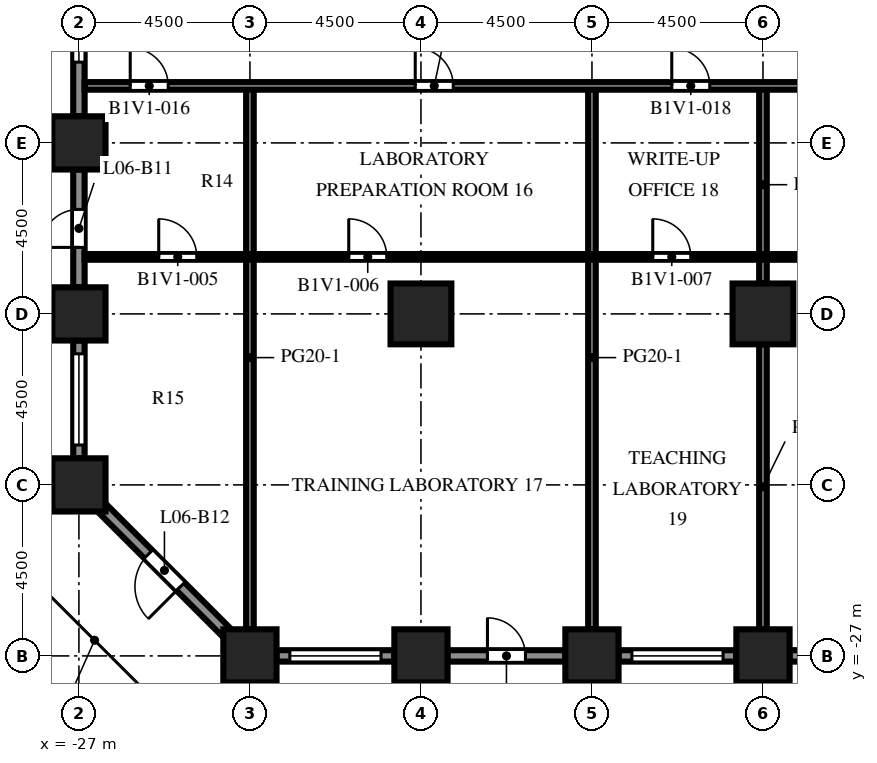
"""IFC4 building model, lengths in metres.
Left out: names, types, materials, properties, quantities, classifications, styles, units other than length and angle.
Written with IfcOpenShell. Run it as: python <this file> out.ifc"""

import sys

from ifc_helpers import new_model, si_unit, direction, frame, frame_2d, origin, origin_2d, place, context, subcontext, project, spatial, rectangle, extrude, element, fill, save


model = new_model("IFC4")
c1 = context("Model", 3, precision=1e-05, world=origin(), true_north=direction((0.0, 1.0)))
c2 = subcontext(c1, "Body", "Model", "MODEL_VIEW")
j1 = project(units=[si_unit("LENGTHUNIT", "METRE"), si_unit("PLANEANGLEUNIT", "RADIAN")], contexts=[c1])
p1 = place(None, origin())
s1 = spatial("IfcSite", under=j1, at=p1, CompositionType="ELEMENT")
p2 = place(p1, origin())
s2 = spatial("IfcBuilding", under=s1, at=p2, CompositionType="ELEMENT")
p3 = place(p2, frame((0.0, 0.0, 27.7)))
s3 = spatial("IfcBuildingStorey", under=s2, at=p3, CompositionType="ELEMENT", Elevation=27.7)
for number, where, z_axis, x_axis in (
    (1, (-27.0, -22.5, 0.0), (0.0, 0.0, 1.0), (1.0, 0.0, 0.0)),
    (2, (-27.0, -18.0, 0.0), (0.0, 0.0, 1.0), (1.0, 0.0, 0.0)),
    (3, (-27.0, -13.5, 0.0), (0.0, 0.0, 1.0), (1.0, 0.0, 0.0)),
    (4, (-22.5, -27.0, 0.0), (0.0, 0.0, 1.0), (1.0, 0.0, 0.0)),
    (5, (-18.0, -27.0, 0.0), (0.0, 0.0, 1.0), (1.0, 0.0, 0.0)),
    (6, (-13.5, -27.0, 0.0), (0.0, 0.0, 1.0), (1.0, 0.0, 0.0)),
    (7, (-9.0, -27.0, 0.0), (0.0, 0.0, 1.0), (1.0, 0.0, 0.0)),
):
    element("IfcColumn", number, at=place(p3, frame(where, z_axis=z_axis, x_axis=x_axis)), inside=s3, PredefinedType="COLUMN", context=c2, shape_type="SweptSolid", body=[
        extrude(rectangle(XDim=1.4, YDim=1.4, at=origin_2d()), origin(), (0.0, 0.0, 1.0), 4.1),
    ])
for number, where, z_axis, x_axis in (
    (8, (-18.0, -18.0, 0.0), (0.0, 0.0, 1.0), (1.0, 0.0, 0.0)),
    (9, (-9.0, -18.0, 0.0), (0.0, 0.0, 1.0), (1.0, 0.0, 0.0)),
):
    element("IfcColumn", number, at=place(p3, frame(where, z_axis=z_axis, x_axis=x_axis)), inside=s3, PredefinedType="COLUMN", context=c2, shape_type="SweptSolid", body=[
        extrude(rectangle(XDim=1.6, YDim=1.6, at=origin_2d()), origin(), (0.0, 0.0, 1.0), 4.1),
    ])
p4 = place(p3, frame((-18.7, -27.0, 0.0), z_axis=(0.0, 0.0, 1.0), x_axis=(-1.0, 0.0, 0.0)))
e10 = element("IfcWall", 10, at=p4, inside=s3, PredefinedType="SOLIDWALL", context=c2, shape_type="SweptSolid", body=[
    extrude(rectangle(XDim=3.1, YDim=0.3, at=frame_2d((1.55, 0.0))), origin(), (0.0, 0.0, 1.0), 2.75),
])
p5 = place(p4, frame((0.35, 0.0, 0.8)))
e11 = element("IfcOpeningElement", 11, at=p5, cuts=e10, PredefinedType="OPENING", context=c2, shape_type="SweptSolid", body=[
    extrude(rectangle(XDim=2.4, YDim=1.7, at=frame_2d((1.2, 0.85))), frame((0.0, 0.16, 0.0), z_axis=(0.0, -1.0, 0.0), x_axis=(1.0, 0.0, 0.0)), (0.0, 0.0, 1.0), 0.32),
])
p6 = place(p3, frame((-14.2, -27.0, 0.0), z_axis=(0.0, 0.0, 1.0), x_axis=(-1.0, 0.0, 0.0)))
e12 = element("IfcWall", 12, at=p6, inside=s3, PredefinedType="SOLIDWALL", context=c2, shape_type="SweptSolid", body=[
    extrude(rectangle(XDim=3.1, YDim=0.3, at=frame_2d((1.55, 0.0))), origin(), (0.0, 0.0, 1.0), 2.75),
])
p7 = place(p6, frame((1.05, 0.0, 0.0)))
e13 = element("IfcOpeningElement", 13, at=p7, cuts=e12, PredefinedType="OPENING", context=c2, shape_type="SweptSolid", body=[
    extrude(rectangle(XDim=1.0, YDim=2.2, at=frame_2d((0.5, 1.1))), frame((0.0, 0.16, 0.0), z_axis=(0.0, -1.0, 0.0), x_axis=(1.0, 0.0, 0.0)), (0.0, 0.0, 1.0), 0.32),
])
p8 = place(p3, frame((-9.7, -27.0, 0.0), z_axis=(0.0, 0.0, 1.0), x_axis=(-1.0, 0.0, 0.0)))
e14 = element("IfcWall", 14, at=p8, inside=s3, PredefinedType="SOLIDWALL", context=c2, shape_type="SweptSolid", body=[
    extrude(rectangle(XDim=3.1, YDim=0.3, at=frame_2d((1.55, 0.0))), origin(), (0.0, 0.0, 1.0), 2.75),
])
p9 = place(p8, frame((0.35, 0.0, 0.8)))
e15 = element("IfcOpeningElement", 15, at=p9, cuts=e14, PredefinedType="OPENING", context=c2, shape_type="SweptSolid", body=[
    extrude(rectangle(XDim=2.4, YDim=1.7, at=frame_2d((1.2, 0.85))), frame((0.0, 0.16, 0.0), z_axis=(0.0, -1.0, 0.0), x_axis=(1.0, 0.0, 0.0)), (0.0, 0.0, 1.0), 0.32),
])
p10 = place(p3, frame((-5.2, -27.0, 0.0), z_axis=(0.0, 0.0, 1.0), x_axis=(-1.0, 0.0, 0.0)))
e16 = element("IfcWall", 16, at=p10, inside=s3, PredefinedType="SOLIDWALL", context=c2, shape_type="SweptSolid", body=[
    extrude(rectangle(XDim=3.1, YDim=0.3, at=frame_2d((1.55, 0.0))), origin(), (0.0, 0.0, 1.0), 2.75),
])
p11 = place(p10, frame((0.35, 0.0, 0.8)))
e17 = element("IfcOpeningElement", 17, at=p11, cuts=e16, PredefinedType="OPENING", context=c2, shape_type="SweptSolid", body=[
    extrude(rectangle(XDim=2.4, YDim=1.7, at=frame_2d((1.2, 0.85))), frame((0.0, 0.16, 0.0), z_axis=(0.0, -1.0, 0.0), x_axis=(1.0, 0.0, 0.0)), (0.0, 0.0, 1.0), 0.32),
])
p12 = place(p3, frame((-27.0, -12.8, 0.0), z_axis=(0.0, 0.0, 1.0), x_axis=(0.0, 1.0, 0.0)))
e18 = element("IfcWall", 18, at=p12, inside=s3, PredefinedType="SOLIDWALL", context=c2, shape_type="SweptSolid", body=[
    extrude(rectangle(XDim=3.1, YDim=0.3, at=frame_2d((1.55, 0.0))), origin(), (0.0, 0.0, 1.0), 2.75),
])
p13 = place(p12, frame((1.425, 0.0, 0.8)))
e19 = element("IfcOpeningElement", 19, at=p13, cuts=e18, PredefinedType="OPENING", context=c2, shape_type="SweptSolid", body=[
    extrude(rectangle(XDim=1.2, YDim=1.7, at=frame_2d((0.6, 0.85))), frame((0.0, 0.16, 0.0), z_axis=(0.0, -1.0, 0.0), x_axis=(1.0, 0.0, 0.0)), (0.0, 0.0, 1.0), 0.32),
])
p14 = place(p3, frame((-27.0, -17.3, 0.0), z_axis=(0.0, 0.0, 1.0), x_axis=(0.0, 1.0, 0.0)))
e20 = element("IfcWall", 20, at=p14, inside=s3, PredefinedType="SOLIDWALL", context=c2, shape_type="SweptSolid", body=[
    extrude(rectangle(XDim=3.1, YDim=0.3, at=frame_2d((1.55, 0.0))), origin(), (0.0, 0.0, 1.0), 2.75),
])
p15 = place(p14, frame((1.05, 0.0, 0.0)))
e21 = element("IfcOpeningElement", 21, at=p15, cuts=e20, PredefinedType="OPENING", context=c2, shape_type="SweptSolid", body=[
    extrude(rectangle(XDim=1.0, YDim=2.2, at=frame_2d((0.5, 1.1))), frame((0.0, 0.16, 0.0), z_axis=(0.0, -1.0, 0.0), x_axis=(1.0, 0.0, 0.0)), (0.0, 0.0, 1.0), 0.32),
])
p16 = place(p3, frame((-27.0, -21.8, 0.0), z_axis=(0.0, 0.0, 1.0), x_axis=(0.0, 1.0, 0.0)))
e22 = element("IfcWall", 22, at=p16, inside=s3, PredefinedType="SOLIDWALL", context=c2, shape_type="SweptSolid", body=[
    extrude(rectangle(XDim=3.1, YDim=0.3, at=frame_2d((1.55, 0.0))), origin(), (0.0, 0.0, 1.0), 2.75),
])
p17 = place(p16, frame((0.35, 0.0, 0.8)))
e23 = element("IfcOpeningElement", 23, at=p17, cuts=e22, PredefinedType="OPENING", context=c2, shape_type="SweptSolid", body=[
    extrude(rectangle(XDim=2.4, YDim=1.7, at=frame_2d((1.2, 0.85))), frame((0.0, 0.16, 0.0), z_axis=(0.0, -1.0, 0.0), x_axis=(1.0, 0.0, 0.0)), (0.0, 0.0, 1.0), 0.32),
])
p18 = place(p3, frame((-23.094, -26.406, 0.0), z_axis=(0.0, 0.0, 1.0), x_axis=(-0.707106781187, 0.707106781187, 0.0)))
e24 = element("IfcWall", 24, at=p18, inside=s3, PredefinedType="SOLIDWALL", context=c2, shape_type="SweptSolid", body=[
    extrude(rectangle(XDim=4.684, YDim=0.3, at=frame_2d((2.342, 0.0))), origin(), (0.0, 0.0, 1.0), 2.75),
])
p19 = place(p18, frame((1.742, 0.0, 0.0)))
e25 = element("IfcOpeningElement", 25, at=p19, cuts=e24, PredefinedType="OPENING", context=c2, shape_type="SweptSolid", body=[
    extrude(rectangle(XDim=1.2, YDim=2.2, at=frame_2d((0.6, 1.1))), frame((0.0, 0.16, 0.0), z_axis=(0.0, -1.0, 0.0), x_axis=(1.0, 0.0, 0.0)), (0.0, 0.0, 1.0), 0.32),
])
for number, where, z_axis, x_axis in (
    (26, (-22.5, -26.3, 0.0), (0.0, 0.0, 1.0), (0.0, 1.0, 0.0)),
    (27, (-13.5, -26.3, 0.0), (0.0, 0.0, 1.0), (0.0, 1.0, 0.0)),
):
    element("IfcWall", number, at=place(p3, frame(where, z_axis=z_axis, x_axis=x_axis)), inside=s3, PredefinedType="PARTITIONING", context=c2, shape_type="SweptSolid", body=[
        extrude(rectangle(XDim=14.3, YDim=0.2, at=frame_2d((7.15, 0.0))), origin(), (0.0, 0.0, 1.0), 3.65),
    ])
p20 = place(p3, frame((-9.0, -26.3, 0.0), z_axis=(0.0, 0.0, 1.0), x_axis=(0.0, 1.0, 0.0)))
e28 = element("IfcWall", 28, at=p20, inside=s3, PredefinedType="PARTITIONING", context=c2, shape_type="SweptSolid", body=[
    extrude(rectangle(XDim=7.5, YDim=0.2, at=frame_2d((3.75, 0.0))), origin(), (0.0, 0.0, 1.0), 3.65),
])
p21 = place(p3, frame((-9.0, -17.2, 0.0), z_axis=(0.0, 0.0, 1.0), x_axis=(0.0, 1.0, 0.0)))
e29 = element("IfcWall", 29, at=p21, inside=s3, PredefinedType="PARTITIONING", context=c2, shape_type="SweptSolid", body=[
    extrude(rectangle(XDim=5.2, YDim=0.2, at=frame_2d((2.6, 0.0))), origin(), (0.0, 0.0, 1.0), 3.65),
])
p22 = place(p3, frame((26.85, -16.5, 0.0), z_axis=(0.0, 0.0, 1.0), x_axis=(-1.0, 0.0, 0.0)))
e30 = element("IfcWall", 30, at=p22, inside=s3, PredefinedType="PARTITIONING", context=c2, shape_type="SweptSolid", body=[
    extrude(rectangle(XDim=53.7, YDim=0.15, at=frame_2d((26.85, 0.0))), origin(), (0.0, 0.0, 1.0), 3.65),
])
p23 = place(p22, frame((50.75, 0.0, 0.0)))
e31 = element("IfcOpeningElement", 31, at=p23, cuts=e30, PredefinedType="OPENING", context=c2, shape_type="SweptSolid", body=[
    extrude(rectangle(XDim=1.0, YDim=2.1, at=frame_2d((0.5, 1.05))), frame((0.0, 0.085, 0.0), z_axis=(0.0, -1.0, 0.0), x_axis=(1.0, 0.0, 0.0)), (0.0, 0.0, 1.0), 0.17),
])
p24 = place(p22, frame((45.75, 0.0, 0.0)))
e32 = element("IfcOpeningElement", 32, at=p24, cuts=e30, PredefinedType="OPENING", context=c2, shape_type="SweptSolid", body=[
    extrude(rectangle(XDim=1.0, YDim=2.1, at=frame_2d((0.5, 1.05))), frame((0.0, 0.085, 0.0), z_axis=(0.0, -1.0, 0.0), x_axis=(1.0, 0.0, 0.0)), (0.0, 0.0, 1.0), 0.17),
])
p25 = place(p22, frame((37.75, 0.0, 0.0)))
e33 = element("IfcOpeningElement", 33, at=p25, cuts=e30, PredefinedType="OPENING", context=c2, shape_type="SweptSolid", body=[
    extrude(rectangle(XDim=1.0, YDim=2.1, at=frame_2d((0.5, 1.05))), frame((0.0, 0.085, 0.0), z_axis=(0.0, -1.0, 0.0), x_axis=(1.0, 0.0, 0.0)), (0.0, 0.0, 1.0), 0.17),
])
p26 = place(p22, frame((28.25, 0.0, 0.0)))
e34 = element("IfcOpeningElement", 34, at=p26, cuts=e30, PredefinedType="OPENING", context=c2, shape_type="SweptSolid", body=[
    extrude(rectangle(XDim=1.0, YDim=2.1, at=frame_2d((0.5, 1.05))), frame((0.0, 0.085, 0.0), z_axis=(0.0, -1.0, 0.0), x_axis=(1.0, 0.0, 0.0)), (0.0, 0.0, 1.0), 0.17),
])
p27 = place(p22, frame((19.75, 0.0, 0.0)))
e35 = element("IfcOpeningElement", 35, at=p27, cuts=e30, PredefinedType="OPENING", context=c2, shape_type="SweptSolid", body=[
    extrude(rectangle(XDim=1.0, YDim=2.1, at=frame_2d((0.5, 1.05))), frame((0.0, 0.085, 0.0), z_axis=(0.0, -1.0, 0.0), x_axis=(1.0, 0.0, 0.0)), (0.0, 0.0, 1.0), 0.17),
])
p28 = place(p22, frame((13.5, 0.0, 0.0)))
e36 = element("IfcOpeningElement", 36, at=p28, cuts=e30, PredefinedType="OPENING", context=c2, shape_type="SweptSolid", body=[
    extrude(rectangle(XDim=1.0, YDim=2.1, at=frame_2d((0.5, 1.05))), frame((0.0, 0.085, 0.0), z_axis=(0.0, -1.0, 0.0), x_axis=(1.0, 0.0, 0.0)), (0.0, 0.0, 1.0), 0.17),
])
p29 = place(p22, frame((6.75, 0.0, 0.0)))
e37 = element("IfcOpeningElement", 37, at=p29, cuts=e30, PredefinedType="OPENING", context=c2, shape_type="SweptSolid", body=[
    extrude(rectangle(XDim=1.0, YDim=2.1, at=frame_2d((0.5, 1.05))), frame((0.0, 0.085, 0.0), z_axis=(0.0, -1.0, 0.0), x_axis=(1.0, 0.0, 0.0)), (0.0, 0.0, 1.0), 0.17),
])
p30 = place(p22, frame((1.25, 0.0, 0.0)))
e38 = element("IfcOpeningElement", 38, at=p30, cuts=e30, PredefinedType="OPENING", context=c2, shape_type="SweptSolid", body=[
    extrude(rectangle(XDim=1.0, YDim=2.1, at=frame_2d((0.5, 1.05))), frame((0.0, 0.085, 0.0), z_axis=(0.0, -1.0, 0.0), x_axis=(1.0, 0.0, 0.0)), (0.0, 0.0, 1.0), 0.17),
])
p31 = place(p3, frame((26.85, -12.0, 0.0), z_axis=(0.0, 0.0, 1.0), x_axis=(-1.0, 0.0, 0.0)))
e39 = element("IfcWall", 39, at=p31, inside=s3, PredefinedType="PARTITIONING", context=c2, shape_type="SweptSolid", body=[
    extrude(rectangle(XDim=53.7, YDim=0.2, at=frame_2d((26.85, 0.0))), origin(), (0.0, 0.0, 1.0), 3.65),
])
p32 = place(p31, frame((51.5, 0.0, 0.0)))
e40 = element("IfcOpeningElement", 40, at=p32, cuts=e39, PredefinedType="OPENING", context=c2, shape_type="SweptSolid", body=[
    extrude(rectangle(XDim=1.0, YDim=2.1, at=frame_2d((0.5, 1.05))), frame((0.0, 0.11, 0.0), z_axis=(0.0, -1.0, 0.0), x_axis=(1.0, 0.0, 0.0)), (0.0, 0.0, 1.0), 0.22),
])
p33 = place(p31, frame((44.0, 0.0, 0.0)))
e41 = element("IfcOpeningElement", 41, at=p33, cuts=e39, PredefinedType="OPENING", context=c2, shape_type="SweptSolid", body=[
    extrude(rectangle(XDim=1.0, YDim=2.1, at=frame_2d((0.5, 1.05))), frame((0.0, 0.11, 0.0), z_axis=(0.0, -1.0, 0.0), x_axis=(1.0, 0.0, 0.0)), (0.0, 0.0, 1.0), 0.22),
])
p34 = place(p31, frame((37.25, 0.0, 0.0)))
e42 = element("IfcOpeningElement", 42, at=p34, cuts=e39, PredefinedType="OPENING", context=c2, shape_type="SweptSolid", body=[
    extrude(rectangle(XDim=1.0, YDim=2.1, at=frame_2d((0.5, 1.05))), frame((0.0, 0.11, 0.0), z_axis=(0.0, -1.0, 0.0), x_axis=(1.0, 0.0, 0.0)), (0.0, 0.0, 1.0), 0.22),
])
p35 = place(p31, frame((30.5, 0.0, 0.0)))
e43 = element("IfcOpeningElement", 43, at=p35, cuts=e39, PredefinedType="OPENING", context=c2, shape_type="SweptSolid", body=[
    extrude(rectangle(XDim=1.0, YDim=2.1, at=frame_2d((0.5, 1.05))), frame((0.0, 0.11, 0.0), z_axis=(0.0, -1.0, 0.0), x_axis=(1.0, 0.0, 0.0)), (0.0, 0.0, 1.0), 0.22),
])
p36 = place(p31, frame((20.0, 0.0, 0.0)))
e44 = element("IfcOpeningElement", 44, at=p36, cuts=e39, PredefinedType="OPENING", context=c2, shape_type="SweptSolid", body=[
    extrude(rectangle(XDim=1.0, YDim=2.1, at=frame_2d((0.5, 1.05))), frame((0.0, 0.11, 0.0), z_axis=(0.0, -1.0, 0.0), x_axis=(1.0, 0.0, 0.0)), (0.0, 0.0, 1.0), 0.22),
])
p37 = place(p31, frame((13.0, 0.0, 0.0)))
e45 = element("IfcOpeningElement", 45, at=p37, cuts=e39, PredefinedType="OPENING", context=c2, shape_type="SweptSolid", body=[
    extrude(rectangle(XDim=1.0, YDim=2.1, at=frame_2d((0.5, 1.05))), frame((0.0, 0.11, 0.0), z_axis=(0.0, -1.0, 0.0), x_axis=(1.0, 0.0, 0.0)), (0.0, 0.0, 1.0), 0.22),
])
p38 = place(p31, frame((5.75, 0.0, 0.0)))
e46 = element("IfcOpeningElement", 46, at=p38, cuts=e39, PredefinedType="OPENING", context=c2, shape_type="SweptSolid", body=[
    extrude(rectangle(XDim=1.0, YDim=2.1, at=frame_2d((0.5, 1.05))), frame((0.0, 0.11, 0.0), z_axis=(0.0, -1.0, 0.0), x_axis=(1.0, 0.0, 0.0)), (0.0, 0.0, 1.0), 0.22),
])
p39 = place(p31, frame((1.25, 0.0, 0.0)))
e47 = element("IfcOpeningElement", 47, at=p39, cuts=e39, PredefinedType="OPENING", context=c2, shape_type="SweptSolid", body=[
    extrude(rectangle(XDim=1.0, YDim=2.1, at=frame_2d((0.5, 1.05))), frame((0.0, 0.11, 0.0), z_axis=(0.0, -1.0, 0.0), x_axis=(1.0, 0.0, 0.0)), (0.0, 0.0, 1.0), 0.22),
])
p40 = place(p5, origin())
e48 = element("IfcWindow", 48, at=p40, inside=s3, PartitioningType="SINGLE_PANEL", PredefinedType="WINDOW", context=c2, shape_type="SweptSolid", body=[
    extrude(rectangle(XDim=2.4, YDim=1.7, at=frame_2d((1.2, 0.85))), frame((0.0, 0.03, 0.0), z_axis=(0.0, -1.0, 0.0), x_axis=(1.0, 0.0, 0.0)), (0.0, 0.0, 1.0), 0.06),
])
fill(e11, e48)
p41 = place(p7, origin())
e49 = element("IfcDoor", 49, at=p41, inside=s3, OperationType="SINGLE_SWING_RIGHT", PredefinedType="DOOR", context=c2, shape_type="SweptSolid", body=[
    extrude(rectangle(XDim=1.0, YDim=2.2, at=frame_2d((0.5, 1.1))), frame((0.0, 0.025, 0.0), z_axis=(0.0, -1.0, 0.0), x_axis=(1.0, 0.0, 0.0)), (0.0, 0.0, 1.0), 0.05),
])
fill(e13, e49)
p42 = place(p9, origin())
e50 = element("IfcWindow", 50, at=p42, inside=s3, PartitioningType="SINGLE_PANEL", PredefinedType="WINDOW", context=c2, shape_type="SweptSolid", body=[
    extrude(rectangle(XDim=2.4, YDim=1.7, at=frame_2d((1.2, 0.85))), frame((0.0, 0.03, 0.0), z_axis=(0.0, -1.0, 0.0), x_axis=(1.0, 0.0, 0.0)), (0.0, 0.0, 1.0), 0.06),
])
fill(e15, e50)
p43 = place(p13, origin())
e51 = element("IfcWindow", 51, at=p43, inside=s3, PartitioningType="SINGLE_PANEL", PredefinedType="WINDOW", context=c2, shape_type="SweptSolid", body=[
    extrude(rectangle(XDim=1.2, YDim=1.7, at=frame_2d((0.6, 0.85))), frame((0.0, 0.03, 0.0), z_axis=(0.0, -1.0, 0.0), x_axis=(1.0, 0.0, 0.0)), (0.0, 0.0, 1.0), 0.06),
])
fill(e19, e51)
p44 = place(p15, origin())
e52 = element("IfcDoor", 52, at=p44, inside=s3, OperationType="SINGLE_SWING_LEFT", PredefinedType="DOOR", context=c2, shape_type="SweptSolid", body=[
    extrude(rectangle(XDim=1.0, YDim=2.2, at=frame_2d((0.5, 1.1))), frame((0.0, 0.025, 0.0), z_axis=(0.0, -1.0, 0.0), x_axis=(1.0, 0.0, 0.0)), (0.0, 0.0, 1.0), 0.05),
])
fill(e21, e52)
p45 = place(p17, origin())
e53 = element("IfcWindow", 53, at=p45, inside=s3, PartitioningType="SINGLE_PANEL", PredefinedType="WINDOW", context=c2, shape_type="SweptSolid", body=[
    extrude(rectangle(XDim=2.4, YDim=1.7, at=frame_2d((1.2, 0.85))), frame((0.0, 0.03, 0.0), z_axis=(0.0, -1.0, 0.0), x_axis=(1.0, 0.0, 0.0)), (0.0, 0.0, 1.0), 0.06),
])
fill(e23, e53)
p46 = place(p19, origin())
e54 = element("IfcDoor", 54, at=p46, inside=s3, OperationType="SINGLE_SWING_LEFT", PredefinedType="DOOR", context=c2, shape_type="SweptSolid", body=[
    extrude(rectangle(XDim=1.2, YDim=2.2, at=frame_2d((0.6, 1.1))), frame((0.0, 0.025, 0.0), z_axis=(0.0, -1.0, 0.0), x_axis=(1.0, 0.0, 0.0)), (0.0, 0.0, 1.0), 0.05),
])
fill(e25, e54)
p47 = place(p23, origin())
e55 = element("IfcDoor", 55, at=p47, inside=s3, OperationType="SINGLE_SWING_RIGHT", PredefinedType="DOOR", context=c2, shape_type="SweptSolid", body=[
    extrude(rectangle(XDim=1.0, YDim=2.1, at=frame_2d((0.5, 1.05))), frame((0.0, 0.025, 0.0), z_axis=(0.0, -1.0, 0.0), x_axis=(1.0, 0.0, 0.0)), (0.0, 0.0, 1.0), 0.05),
])
fill(e31, e55)
p48 = place(p24, origin())
e56 = element("IfcDoor", 56, at=p48, inside=s3, OperationType="SINGLE_SWING_RIGHT", PredefinedType="DOOR", context=c2, shape_type="SweptSolid", body=[
    extrude(rectangle(XDim=1.0, YDim=2.1, at=frame_2d((0.5, 1.05))), frame((0.0, 0.025, 0.0), z_axis=(0.0, -1.0, 0.0), x_axis=(1.0, 0.0, 0.0)), (0.0, 0.0, 1.0), 0.05),
])
fill(e32, e56)
p49 = place(p25, origin())
e57 = element("IfcDoor", 57, at=p49, inside=s3, OperationType="SINGLE_SWING_RIGHT", PredefinedType="DOOR", context=c2, shape_type="SweptSolid", body=[
    extrude(rectangle(XDim=1.0, YDim=2.1, at=frame_2d((0.5, 1.05))), frame((0.0, 0.025, 0.0), z_axis=(0.0, -1.0, 0.0), x_axis=(1.0, 0.0, 0.0)), (0.0, 0.0, 1.0), 0.05),
])
fill(e33, e57)
p50 = place(p32, origin())
e58 = element("IfcDoor", 58, at=p50, inside=s3, OperationType="SINGLE_SWING_RIGHT", PredefinedType="DOOR", context=c2, shape_type="SweptSolid", body=[
    extrude(rectangle(XDim=1.0, YDim=2.1, at=frame_2d((0.5, 1.05))), frame((0.0, 0.025, 0.0), z_axis=(0.0, -1.0, 0.0), x_axis=(1.0, 0.0, 0.0)), (0.0, 0.0, 1.0), 0.05),
])
fill(e40, e58)
p51 = place(p33, origin())
e59 = element("IfcDoor", 59, at=p51, inside=s3, OperationType="SINGLE_SWING_RIGHT", PredefinedType="DOOR", context=c2, shape_type="SweptSolid", body=[
    extrude(rectangle(XDim=1.0, YDim=2.1, at=frame_2d((0.5, 1.05))), frame((0.0, 0.025, 0.0), z_axis=(0.0, -1.0, 0.0), x_axis=(1.0, 0.0, 0.0)), (0.0, 0.0, 1.0), 0.05),
])
fill(e41, e59)
p52 = place(p34, origin())
e60 = element("IfcDoor", 60, at=p52, inside=s3, OperationType="SINGLE_SWING_RIGHT", PredefinedType="DOOR", context=c2, shape_type="SweptSolid", body=[
    extrude(rectangle(XDim=1.0, YDim=2.1, at=frame_2d((0.5, 1.05))), frame((0.0, 0.025, 0.0), z_axis=(0.0, -1.0, 0.0), x_axis=(1.0, 0.0, 0.0)), (0.0, 0.0, 1.0), 0.05),
])
fill(e42, e60)
save(model, sys.argv[1])
